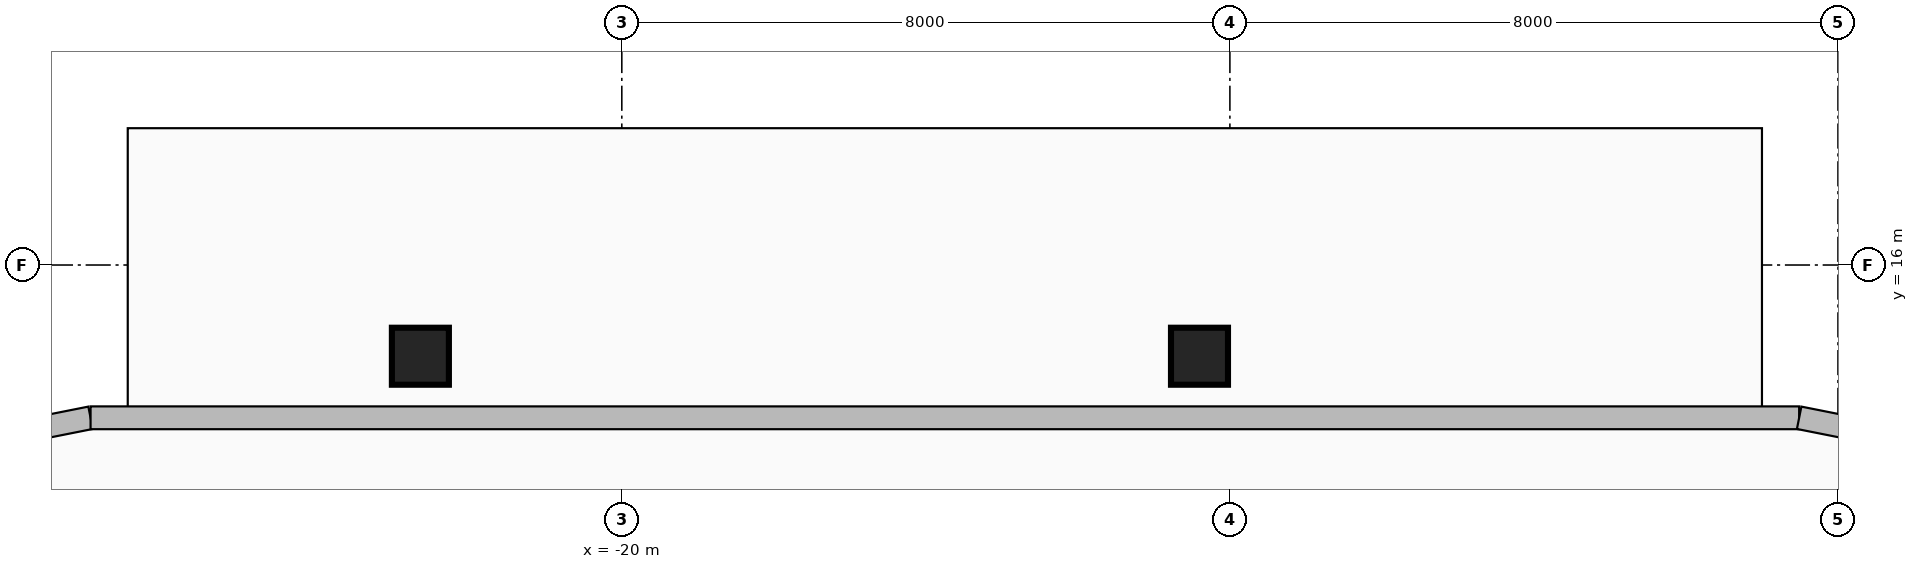
"""IFC4 building model, lengths in metres.
Left out: names, types, materials, properties, quantities, classifications, styles, units other than length and angle.
Written with IfcOpenShell. Run it as: python <this file> out.ifc"""

import sys

from ifc_helpers import new_model, si_unit, direction, frame, frame_2d, origin, origin_2d, place, context, subcontext, project, spatial, rectangle, extrude, source, transform, mapped, element, fill, save


model = new_model("IFC4")
c1 = context("Model", 3, precision=1e-05, world=origin(), true_north=direction((0.0, 1.0)))
c2 = subcontext(c1, "Body", "Model", "MODEL_VIEW")
j1 = project(units=[si_unit("LENGTHUNIT", "METRE"), si_unit("PLANEANGLEUNIT", "RADIAN")], contexts=[c1])
p1 = place(None, origin())
s1 = spatial("IfcSite", under=j1, at=p1, CompositionType="ELEMENT")
p2 = place(p1, origin())
s2 = spatial("IfcBuilding", under=s1, at=p2, CompositionType="ELEMENT")
p3 = place(p2, frame((0.0, 0.0, 290.6)))
s3 = spatial("IfcBuildingStorey", under=s2, at=p3, CompositionType="ELEMENT", Elevation=290.6)
m1 = source(origin(), c2, "Body", "SweptSolid", [
    extrude(rectangle(XDim=0.75, YDim=0.75, at=origin_2d()), origin(), (0.0, 0.0, 1.0), 3.6),
])
for number, where, z_axis, x_axis in (
    (1, (-22.65, 14.8, 0.0), (0.0, 0.0, 1.0), (1.0, 0.0, 0.0)),
    (2, (-12.4, 14.8, 0.0), (0.0, 0.0, 1.0), (1.0, 0.0, 0.0)),
):
    element("IfcColumn", number, at=place(p3, frame(where, z_axis=z_axis, x_axis=x_axis)), inside=s3, PredefinedType="COLUMN", context=c2, shape_type="MappedRepresentation", body=[
        mapped(m1, transform((0.0, 0.0, 0.0), x_axis=(1.0, 0.0, 0.0), y_axis=(0.0, 1.0, 0.0), z_axis=(0.0, 0.0, 1.0), scale=1.0)),
    ])
p4 = place(p3, frame((-28.105, 13.768, 0.0), z_axis=(0.0, 0.0, 1.0), x_axis=(0.980794657743, 0.195043173023, 0.0)))
e3 = element("IfcWall", 3, at=p4, inside=s3, PredefinedType="SOLIDWALL", context=c2, shape_type="SweptSolid", body=[
    extrude(rectangle(XDim=1.138, YDim=0.3, at=frame_2d((0.569, 0.0))), origin(), (0.0, 0.0, 1.0), 2.939),
])
p5 = place(p3, frame((-26.989, 13.99, 0.0), z_axis=(0.0, 0.0, 1.0), x_axis=(1.0, 0.0, 0.0)))
e4 = element("IfcWall", 4, at=p5, inside=s3, PredefinedType="SOLIDWALL", context=c2, shape_type="SweptSolid", body=[
    extrude(rectangle(XDim=22.479, YDim=0.3, at=frame_2d((11.239, 0.0))), origin(), (0.0, 0.0, 1.0), 2.734),
])
p6 = place(p5, frame((10.79, 0.0, 0.0)))
e5 = element("IfcOpeningElement", 5, at=p6, cuts=e4, PredefinedType="OPENING", context=c2, shape_type="SweptSolid", body=[
    extrude(rectangle(XDim=1.2, YDim=2.15, at=frame_2d((0.6, 1.075))), frame((0.0, 0.165, 0.0), z_axis=(0.0, -1.0, 0.0), x_axis=(1.0, 0.0, 0.0)), (0.0, 0.0, 1.0), 0.33),
])
p7 = place(p3, frame((-4.511, 13.99, 0.0), z_axis=(0.0, 0.0, 1.0), x_axis=(0.980794657743, -0.195043173023, 0.0)))
e6 = element("IfcWall", 6, at=p7, inside=s3, PredefinedType="SOLIDWALL", context=c2, shape_type="SweptSolid", body=[
    extrude(rectangle(XDim=1.138, YDim=0.3, at=frame_2d((0.569, 0.0))), origin(), (0.0, 0.0, 1.0), 3.36),
])
p8 = place(p6, origin())
e7 = element("IfcDoor", 7, at=p8, inside=s3, OperationType="SINGLE_SWING_LEFT", PredefinedType="DOOR", context=c2, shape_type="SweptSolid", body=[
    extrude(rectangle(XDim=1.2, YDim=2.15, at=frame_2d((0.6, 1.075))), frame((0.0, 0.025, 0.0), z_axis=(0.0, -1.0, 0.0), x_axis=(1.0, 0.0, 0.0)), (0.0, 0.0, 1.0), 0.05),
])
fill(e5, e7)
save(model, sys.argv[1])
